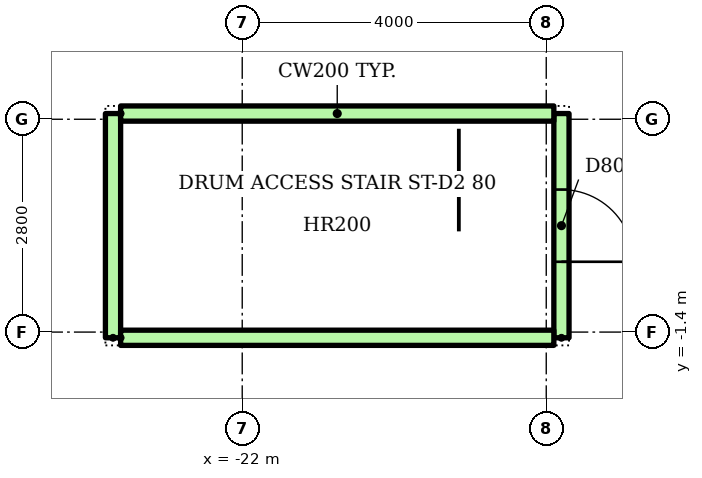
"""IFC4 building model, lengths in metres.
Left out: names, types, materials, properties, quantities, classifications, styles, units other than length and angle.
Written with IfcOpenShell. Run it as: python <this file> out.ifc"""

import sys

from ifc_helpers import new_model, si_unit, direction, frame, frame_2d, origin, place, context, subcontext, project, spatial, rectangle, extrude, element, fill, save


model = new_model("IFC4")
c1 = context("Model", 3, precision=1e-05, world=origin(), true_north=direction((0.0, 1.0)))
c2 = subcontext(c1, "Body", "Model", "MODEL_VIEW")
j1 = project(units=[si_unit("LENGTHUNIT", "METRE"), si_unit("PLANEANGLEUNIT", "RADIAN")], contexts=[c1])
p1 = place(None, origin())
s1 = spatial("IfcSite", under=j1, at=p1, CompositionType="ELEMENT")
p2 = place(p1, origin())
s2 = spatial("IfcBuilding", under=s1, at=p2, CompositionType="ELEMENT")
p3 = place(p2, frame((0.0, 0.0, 313.4)))
s3 = spatial("IfcBuildingStorey", under=s2, at=p3, CompositionType="ELEMENT", Elevation=313.4)
p4 = place(p3, frame((-23.7, -1.475, 0.0), z_axis=(0.0, 0.0, 1.0), x_axis=(0.0, 1.0, 0.0)))
e1 = element("IfcWall", 1, at=p4, inside=s3, PredefinedType="SHEAR", context=c2, shape_type="SweptSolid", body=[
    extrude(rectangle(XDim=2.95, YDim=0.2, at=frame_2d((1.475, 0.0))), origin(), (0.0, 0.0, 1.0), 2.7),
])
p5 = place(p3, frame((-17.8, -1.475, 0.0), z_axis=(0.0, 0.0, 1.0), x_axis=(0.0, 1.0, 0.0)))
e2 = element("IfcWall", 2, at=p5, inside=s3, PredefinedType="SHEAR", context=c2, shape_type="SweptSolid", body=[
    extrude(rectangle(XDim=2.95, YDim=0.2, at=frame_2d((1.475, 0.0))), origin(), (0.0, 0.0, 1.0), 2.7),
])
p6 = place(p5, frame((1.0, 0.0, 0.0)))
e3 = element("IfcOpeningElement", 3, at=p6, cuts=e2, PredefinedType="OPENING", context=c2, shape_type="SweptSolid", body=[
    extrude(rectangle(XDim=0.95, YDim=2.1, at=frame_2d((0.475, 1.05))), frame((0.0, 0.11, 0.0), z_axis=(0.0, -1.0, 0.0), x_axis=(1.0, 0.0, 0.0)), (0.0, 0.0, 1.0), 0.22),
])
for number, where in (
    (4, (-23.6, 1.475, 0.0)),
    (5, (-23.6, -1.475, 0.0)),
):
    element("IfcWall", number, at=place(p3, frame(where)), inside=s3, PredefinedType="SHEAR", context=c2, shape_type="SweptSolid", body=[
        extrude(rectangle(XDim=5.7, YDim=0.2, at=frame_2d((2.85, 0.0))), origin(), (0.0, 0.0, 1.0), 2.7),
    ])
p7 = place(p6, frame((0.95, 0.0, 0.0), z_axis=(0.0, 0.0, 1.0), x_axis=(-1.0, 0.0, 0.0)))
e6 = element("IfcDoor", 6, at=p7, inside=s3, OperationType="SINGLE_SWING_LEFT", PredefinedType="DOOR", context=c2, shape_type="SweptSolid", body=[
    extrude(rectangle(XDim=0.95, YDim=2.1, at=frame_2d((0.475, 1.05))), frame((0.0, 0.025, 0.0), z_axis=(0.0, -1.0, 0.0), x_axis=(1.0, 0.0, 0.0)), (0.0, 0.0, 1.0), 0.05),
])
fill(e3, e6)
save(model, sys.argv[1])
